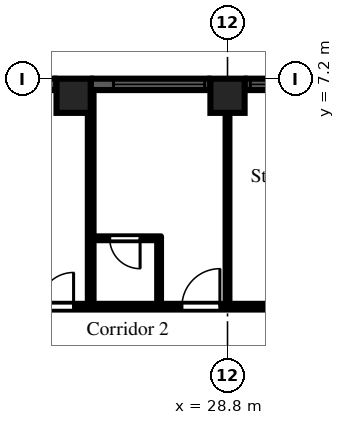
"""IFC4 building model, lengths in metres.
Left out: names, types, materials, properties, quantities, classifications, styles, units other than length and angle.
Written with IfcOpenShell. Run it as: python <this file> out.ifc"""

import sys

from ifc_helpers import new_model, si_unit, direction, frame, frame_2d, origin, origin_2d, place, context, subcontext, project, spatial, rectangle, extrude, element, fill, save


model = new_model("IFC4")
c1 = context("Model", 3, precision=1e-05, world=origin(), true_north=direction((0.0, 1.0)))
c2 = subcontext(c1, "Body", "Model", "MODEL_VIEW")
j1 = project(units=[si_unit("LENGTHUNIT", "METRE"), si_unit("PLANEANGLEUNIT", "RADIAN")], contexts=[c1])
p1 = place(None, origin())
s1 = spatial("IfcSite", under=j1, at=p1, CompositionType="ELEMENT")
p2 = place(p1, origin())
s2 = spatial("IfcBuilding", under=s1, at=p2, CompositionType="ELEMENT")
p3 = place(p2, frame((0.0, 0.0, 75.9)))
s3 = spatial("IfcBuildingStorey", under=s2, at=p3, CompositionType="ELEMENT", Elevation=75.9)
for number, where, z_axis, x_axis in (
    (1, (24.75, 6.75, 0.0), (0.0, 0.0, 1.0), (1.0, 0.0, 0.0)),
    (2, (28.8, 6.75, 0.0), (0.0, 0.0, 1.0), (1.0, 0.0, 0.0)),
):
    element("IfcColumn", number, at=place(p3, frame(where, z_axis=z_axis, x_axis=x_axis)), inside=s3, PredefinedType="COLUMN", context=c2, shape_type="SweptSolid", body=[
        extrude(rectangle(XDim=0.9, YDim=0.9, at=origin_2d()), origin(), (0.0, 0.0, 1.0), 3.0),
    ])
p4 = place(p3, frame((35.55, 7.05, 0.0), z_axis=(0.0, 0.0, 1.0), x_axis=(-1.0, 0.0, 0.0)))
e3 = element("IfcWall", 3, at=p4, inside=s3, PredefinedType="SOLIDWALL", context=c2, shape_type="SweptSolid", body=[
    extrude(rectangle(XDim=6.3, YDim=0.3, at=frame_2d((3.15, 0.0))), origin(), (0.0, 0.0, 1.0), 2.1),
])
p5 = place(p4, frame((0.15, 0.0, 0.2)))
e4 = element("IfcOpeningElement", 4, at=p5, cuts=e3, PredefinedType="OPENING", context=c2, shape_type="SweptSolid", body=[
    extrude(rectangle(XDim=2.4, YDim=1.85, at=frame_2d((1.2, 0.925))), frame((0.0, 0.16, 0.0), z_axis=(0.0, -1.0, 0.0), x_axis=(1.0, 0.0, 0.0)), (0.0, 0.0, 1.0), 0.32),
])
p6 = place(p4, frame((3.75, 0.0, 0.2)))
e5 = element("IfcOpeningElement", 5, at=p6, cuts=e3, PredefinedType="OPENING", context=c2, shape_type="SweptSolid", body=[
    extrude(rectangle(XDim=2.4, YDim=1.85, at=frame_2d((1.2, 0.925))), frame((0.0, 0.16, 0.0), z_axis=(0.0, -1.0, 0.0), x_axis=(1.0, 0.0, 0.0)), (0.0, 0.0, 1.0), 0.32),
])
p7 = place(p3, frame((28.35, 7.05, 0.0), z_axis=(0.0, 0.0, 1.0), x_axis=(-1.0, 0.0, 0.0)))
e6 = element("IfcWall", 6, at=p7, inside=s3, PredefinedType="SOLIDWALL", context=c2, shape_type="SweptSolid", body=[
    extrude(rectangle(XDim=3.15, YDim=0.3, at=frame_2d((1.575, 0.0))), origin(), (0.0, 0.0, 1.0), 2.1),
])
p8 = place(p7, frame((0.15, 0.0, 0.2)))
e7 = element("IfcOpeningElement", 7, at=p8, cuts=e6, PredefinedType="OPENING", context=c2, shape_type="SweptSolid", body=[
    extrude(rectangle(XDim=2.4, YDim=1.85, at=frame_2d((1.2, 0.925))), frame((0.0, 0.16, 0.0), z_axis=(0.0, -1.0, 0.0), x_axis=(1.0, 0.0, 0.0)), (0.0, 0.0, 1.0), 0.32),
])
p9 = place(p3, frame((24.3, 7.05, 0.0), z_axis=(0.0, 0.0, 1.0), x_axis=(-1.0, 0.0, 0.0)))
e8 = element("IfcWall", 8, at=p9, inside=s3, PredefinedType="SOLIDWALL", context=c2, shape_type="SweptSolid", body=[
    extrude(rectangle(XDim=2.7, YDim=0.3, at=frame_2d((1.35, 0.0))), origin(), (0.0, 0.0, 1.0), 2.1),
])
p10 = place(p3, frame((21.6, 1.2, 0.0), z_axis=(0.0, 0.0, 1.0), x_axis=(1.0, 0.0, 0.0)))
e9 = element("IfcWall", 9, at=p10, inside=s3, PredefinedType="PARTITIONING", context=c2, shape_type="SweptSolid", body=[
    extrude(rectangle(XDim=14.9, YDim=0.15, at=frame_2d((7.45, 0.0))), origin(), (0.0, 0.0, 1.0), 2.575),
])
p11 = place(p10, frame((0.45, 0.0, 0.0)))
e10 = element("IfcOpeningElement", 10, at=p11, cuts=e9, PredefinedType="OPENING", context=c2, shape_type="SweptSolid", body=[
    extrude(rectangle(XDim=0.9, YDim=2.1, at=frame_2d((0.45, 1.05))), frame((0.0, 0.085, 0.0), z_axis=(0.0, -1.0, 0.0), x_axis=(1.0, 0.0, 0.0)), (0.0, 0.0, 1.0), 0.17),
])
p12 = place(p10, frame((2.25, 0.0, 0.0)))
e11 = element("IfcOpeningElement", 11, at=p12, cuts=e9, PredefinedType="OPENING", context=c2, shape_type="SweptSolid", body=[
    extrude(rectangle(XDim=0.9, YDim=2.1, at=frame_2d((0.45, 1.05))), frame((0.0, 0.085, 0.0), z_axis=(0.0, -1.0, 0.0), x_axis=(1.0, 0.0, 0.0)), (0.0, 0.0, 1.0), 0.17),
])
p13 = place(p10, frame((6.0, 0.0, 0.0)))
e12 = element("IfcOpeningElement", 12, at=p13, cuts=e9, PredefinedType="OPENING", context=c2, shape_type="SweptSolid", body=[
    extrude(rectangle(XDim=1.0, YDim=2.1, at=frame_2d((0.5, 1.05))), frame((0.0, 0.085, 0.0), z_axis=(0.0, -1.0, 0.0), x_axis=(1.0, 0.0, 0.0)), (0.0, 0.0, 1.0), 0.17),
])
p14 = place(p10, frame((8.55, 0.0, 0.0)))
e13 = element("IfcOpeningElement", 13, at=p14, cuts=e9, PredefinedType="OPENING", context=c2, shape_type="SweptSolid", body=[
    extrude(rectangle(XDim=0.9, YDim=2.1, at=frame_2d((0.45, 1.05))), frame((0.0, 0.085, 0.0), z_axis=(0.0, -1.0, 0.0), x_axis=(1.0, 0.0, 0.0)), (0.0, 0.0, 1.0), 0.17),
])
p15 = place(p10, frame((11.95, 0.0, 0.0)))
e14 = element("IfcOpeningElement", 14, at=p15, cuts=e9, PredefinedType="OPENING", context=c2, shape_type="SweptSolid", body=[
    extrude(rectangle(XDim=1.8, YDim=2.1, at=frame_2d((0.9, 1.05))), frame((0.0, 0.085, 0.0), z_axis=(0.0, -1.0, 0.0), x_axis=(1.0, 0.0, 0.0)), (0.0, 0.0, 1.0), 0.17),
])
p16 = place(p3, frame((25.2, 1.275, 0.0), z_axis=(0.0, 0.0, 1.0), x_axis=(0.0, 1.0, 0.0)))
e15 = element("IfcWall", 15, at=p16, inside=s3, PredefinedType="PARTITIONING", context=c2, shape_type="SweptSolid", body=[
    extrude(rectangle(XDim=5.625, YDim=0.15, at=frame_2d((2.812, 0.0))), origin(), (0.0, 0.0, 1.0), 2.575),
])
p17 = place(p3, frame((25.275, 3.0, 0.0), z_axis=(0.0, 0.0, 1.0), x_axis=(1.0, 0.0, 0.0)))
e16 = element("IfcWall", 16, at=p17, inside=s3, PredefinedType="PARTITIONING", context=c2, shape_type="SweptSolid", body=[
    extrude(rectangle(XDim=1.775, YDim=0.1, at=frame_2d((0.888, 0.0))), origin(), (0.0, 0.0, 1.0), 2.575),
])
p18 = place(p17, frame((0.425, 0.0, 0.0)))
e17 = element("IfcOpeningElement", 17, at=p18, cuts=e16, PredefinedType="OPENING", context=c2, shape_type="SweptSolid", body=[
    extrude(rectangle(XDim=0.8, YDim=2.1, at=frame_2d((0.4, 1.05))), frame((0.0, 0.06, 0.0), z_axis=(0.0, -1.0, 0.0), x_axis=(1.0, 0.0, 0.0)), (0.0, 0.0, 1.0), 0.12),
])
p19 = place(p3, frame((27.0, 1.275, 0.0), z_axis=(0.0, 0.0, 1.0), x_axis=(0.0, 1.0, 0.0)))
e18 = element("IfcWall", 18, at=p19, inside=s3, PredefinedType="PARTITIONING", context=c2, shape_type="SweptSolid", body=[
    extrude(rectangle(XDim=1.675, YDim=0.1, at=frame_2d((0.837, 0.0))), origin(), (0.0, 0.0, 1.0), 2.575),
])
p20 = place(p3, frame((28.8, 1.275, 0.0), z_axis=(0.0, 0.0, 1.0), x_axis=(0.0, 1.0, 0.0)))
e19 = element("IfcWall", 19, at=p20, inside=s3, PredefinedType="PARTITIONING", context=c2, shape_type="SweptSolid", body=[
    extrude(rectangle(XDim=5.625, YDim=0.1, at=frame_2d((2.812, 0.0))), origin(), (0.0, 0.0, 1.0), 2.575),
])
p21 = place(p6, origin())
e20 = element("IfcWindow", 20, at=p21, inside=s3, PartitioningType="SINGLE_PANEL", PredefinedType="WINDOW", context=c2, shape_type="SweptSolid", body=[
    extrude(rectangle(XDim=2.4, YDim=1.85, at=frame_2d((1.2, 0.925))), frame((0.0, 0.03, 0.0), z_axis=(0.0, -1.0, 0.0), x_axis=(1.0, 0.0, 0.0)), (0.0, 0.0, 1.0), 0.06),
])
fill(e5, e20)
p22 = place(p8, origin())
e21 = element("IfcWindow", 21, at=p22, inside=s3, PartitioningType="SINGLE_PANEL", PredefinedType="WINDOW", context=c2, shape_type="SweptSolid", body=[
    extrude(rectangle(XDim=2.4, YDim=1.85, at=frame_2d((1.2, 0.925))), frame((0.0, 0.03, 0.0), z_axis=(0.0, -1.0, 0.0), x_axis=(1.0, 0.0, 0.0)), (0.0, 0.0, 1.0), 0.06),
])
fill(e7, e21)
p23 = place(p12, origin())
e22 = element("IfcDoor", 22, at=p23, inside=s3, OperationType="SINGLE_SWING_RIGHT", PredefinedType="DOOR", context=c2, shape_type="SweptSolid", body=[
    extrude(rectangle(XDim=0.9, YDim=2.1, at=frame_2d((0.45, 1.05))), frame((0.0, 0.025, 0.0), z_axis=(0.0, -1.0, 0.0), x_axis=(1.0, 0.0, 0.0)), (0.0, 0.0, 1.0), 0.05),
])
fill(e11, e22)
p24 = place(p18, frame((0.8, 0.0, 0.0), z_axis=(0.0, 0.0, 1.0), x_axis=(-1.0, 0.0, 0.0)))
e23 = element("IfcDoor", 23, at=p24, inside=s3, OperationType="SINGLE_SWING_LEFT", PredefinedType="DOOR", context=c2, shape_type="SweptSolid", body=[
    extrude(rectangle(XDim=0.8, YDim=2.1, at=frame_2d((0.4, 1.05))), frame((0.0, 0.025, 0.0), z_axis=(0.0, -1.0, 0.0), x_axis=(1.0, 0.0, 0.0)), (0.0, 0.0, 1.0), 0.05),
])
fill(e17, e23)
p25 = place(p13, origin())
e24 = element("IfcDoor", 24, at=p25, inside=s3, OperationType="SINGLE_SWING_RIGHT", PredefinedType="DOOR", context=c2, shape_type="SweptSolid", body=[
    extrude(rectangle(XDim=1.0, YDim=2.1, at=frame_2d((0.5, 1.05))), frame((0.0, 0.025, 0.0), z_axis=(0.0, -1.0, 0.0), x_axis=(1.0, 0.0, 0.0)), (0.0, 0.0, 1.0), 0.05),
])
fill(e12, e24)
save(model, sys.argv[1])
